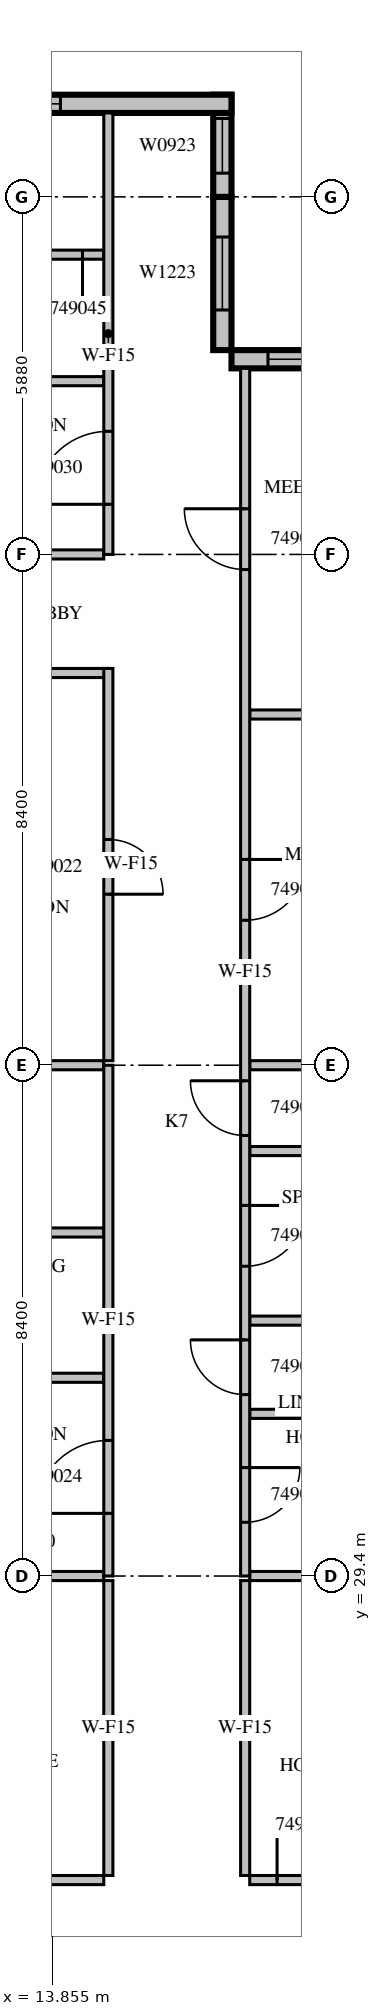
"""IFC4 building model, lengths in metres.
Left out: names, types, materials, properties, quantities, classifications, styles, units other than length and angle.
Written with IfcOpenShell. Run it as: python <this file> out.ifc"""

import sys

from ifc_helpers import new_model, si_unit, direction, frame, frame_2d, origin, place, context, subcontext, project, spatial, rectangle, extrude, source, transform, mapped, element, fill, save


model = new_model("IFC4")
c1 = context("Model", 3, precision=1e-05, world=origin(), true_north=direction((0.0, 1.0)))
c2 = subcontext(c1, "Body", "Model", "MODEL_VIEW")
j1 = project(units=[si_unit("LENGTHUNIT", "METRE"), si_unit("PLANEANGLEUNIT", "RADIAN")], contexts=[c1])
p1 = place(None, origin())
s1 = spatial("IfcSite", under=j1, at=p1, CompositionType="ELEMENT")
p2 = place(p1, origin())
s2 = spatial("IfcBuilding", under=s1, at=p2, CompositionType="ELEMENT")
p3 = place(p2, frame((0.0, 0.0, 219.6)))
s3 = spatial("IfcBuildingStorey", under=s2, at=p3, CompositionType="ELEMENT", Elevation=219.6)
m1 = source(origin(), c2, "Body", "SweptSolid", [
    extrude(rectangle(XDim=4.2, YDim=0.3, at=frame_2d((2.1, 0.0))), origin(), (0.0, 0.0, 1.0), 3.4),
])
p4 = place(p3, frame((21.0, 49.41, 0.0), z_axis=(0.0, 0.0, 1.0), x_axis=(-1.0, 0.0, 0.0)))
e1 = element("IfcWall", 1, at=p4, inside=s3, PredefinedType="STANDARD", context=c2, shape_type="MappedRepresentation", body=[
    mapped(m1, transform((0.0, 0.0, 0.0), scale=1.0)),
])
m2 = source(origin(), c2, "Body", "SweptSolid", [
    extrude(rectangle(XDim=3.0, YDim=2.3, at=frame_2d((1.5, 1.15))), frame((0.0, 0.16, 0.0), z_axis=(0.0, -1.0, 0.0), x_axis=(1.0, 0.0, 0.0)), (0.0, 0.0, 1.0), 0.32),
])
p5 = place(p4, frame((0.6, 0.0, 0.6)))
e2 = element("IfcOpeningElement", 2, at=p5, cuts=e1, PredefinedType="OPENING", context=c2, shape_type="MappedRepresentation", body=[
    mapped(m2, transform((0.0, 0.0, 0.0), scale=1.0)),
])
m3 = source(origin(), c2, "Body", "SweptSolid", [
    extrude(rectangle(XDim=2.52, YDim=0.3, at=frame_2d((1.26, 0.0))), origin(), (0.0, 0.0, 1.0), 3.4),
])
p6 = place(p3, frame((16.65, 49.56, 0.0), z_axis=(0.0, 0.0, 1.0), x_axis=(0.0, 1.0, 0.0)))
e3 = element("IfcWall", 3, at=p6, inside=s3, PredefinedType="STANDARD", context=c2, shape_type="MappedRepresentation", body=[
    mapped(m3, transform((0.0, 0.0, 0.0), scale=1.0)),
])
m4 = source(origin(), c2, "Body", "SweptSolid", [
    extrude(rectangle(XDim=1.2, YDim=2.3, at=frame_2d((0.6, 1.15))), frame((0.0, 0.16, 0.0), z_axis=(0.0, -1.0, 0.0), x_axis=(1.0, 0.0, 0.0)), (0.0, 0.0, 1.0), 0.32),
])
p7 = place(p6, frame((0.66, 0.0, 0.6)))
e4 = element("IfcOpeningElement", 4, at=p7, cuts=e3, PredefinedType="OPENING", context=c2, shape_type="MappedRepresentation", body=[
    mapped(m4, transform((0.0, 0.0, 0.0), scale=1.0)),
])
m5 = source(origin(), c2, "Body", "SweptSolid", [
    extrude(rectangle(XDim=1.68, YDim=0.3, at=frame_2d((0.84, 0.0))), origin(), (0.0, 0.0, 1.0), 3.4),
])
p8 = place(p3, frame((16.65, 52.08, 0.0), z_axis=(0.0, 0.0, 1.0), x_axis=(0.0, 1.0, 0.0)))
e5 = element("IfcWall", 5, at=p8, inside=s3, PredefinedType="STANDARD", context=c2, shape_type="MappedRepresentation", body=[
    mapped(m5, transform((0.0, 0.0, 0.0), scale=1.0)),
])
m6 = source(origin(), c2, "Body", "SweptSolid", [
    extrude(rectangle(XDim=0.9, YDim=2.3, at=frame_2d((0.45, 1.15))), frame((0.0, 0.16, 0.0), z_axis=(0.0, -1.0, 0.0), x_axis=(1.0, 0.0, 0.0)), (0.0, 0.0, 1.0), 0.32),
])
p9 = place(p8, frame((0.39, 0.0, 0.6)))
e6 = element("IfcOpeningElement", 6, at=p9, cuts=e5, PredefinedType="OPENING", context=c2, shape_type="MappedRepresentation", body=[
    mapped(m6, transform((0.0, 0.0, 0.0), scale=1.0)),
])
m7 = source(origin(), c2, "Body", "SweptSolid", [
    extrude(rectangle(XDim=10.5, YDim=0.3, at=frame_2d((5.25, 0.0))), origin(), (0.0, 0.0, 1.0), 3.4),
])
p10 = place(p3, frame((16.8, 53.61, 0.0), z_axis=(0.0, 0.0, 1.0), x_axis=(-1.0, 0.0, 0.0)))
e7 = element("IfcWall", 7, at=p10, inside=s3, PredefinedType="STANDARD", context=c2, shape_type="MappedRepresentation", body=[
    mapped(m7, transform((0.0, 0.0, 0.0), scale=1.0)),
])
m8 = source(origin(), c2, "Body", "SweptSolid", [
    extrude(rectangle(XDim=1.8, YDim=2.3, at=frame_2d((0.9, 1.15))), frame((0.0, 0.16, 0.0), z_axis=(0.0, -1.0, 0.0), x_axis=(1.0, 0.0, 0.0)), (0.0, 0.0, 1.0), 0.32),
])
p11 = place(p10, frame((8.025, 0.0, 0.6)))
e8 = element("IfcOpeningElement", 8, at=p11, cuts=e7, PredefinedType="OPENING", context=c2, shape_type="MappedRepresentation", body=[
    mapped(m8, transform((0.0, 0.0, 0.0), scale=1.0)),
])
m9 = source(origin(), c2, "Body", "SweptSolid", [
    extrude(rectangle(XDim=2.4, YDim=2.3, at=frame_2d((1.2, 1.15))), frame((0.0, 0.16, 0.0), z_axis=(0.0, -1.0, 0.0), x_axis=(1.0, 0.0, 0.0)), (0.0, 0.0, 1.0), 0.32),
])
p12 = place(p10, frame((2.812, 0.0, 0.6)))
e9 = element("IfcOpeningElement", 9, at=p12, cuts=e7, PredefinedType="OPENING", context=c2, shape_type="MappedRepresentation", body=[
    mapped(m9, transform((0.0, 0.0, 0.0), scale=1.0)),
])
m10 = source(origin(), c2, "Body", "SweptSolid", [
    extrude(rectangle(XDim=8.195, YDim=0.15, at=frame_2d((4.098, 0.0))), origin(), (0.0, 0.0, 1.0), 3.4),
])
p13 = place(p3, frame((6.505, 24.4, 0.0), z_axis=(0.0, 0.0, 1.0), x_axis=(1.0, 0.0, 0.0)))
e10 = element("IfcWall", 10, at=p13, inside=s3, PredefinedType="PARTITIONING", context=c2, shape_type="MappedRepresentation", body=[
    mapped(m10, transform((0.0, 0.0, 0.0), scale=1.0)),
])
m11 = source(origin(), c2, "Body", "SweptSolid", [
    extrude(rectangle(XDim=0.9, YDim=2.1, at=frame_2d((0.45, 1.05))), frame((0.0, 0.085, 0.0), z_axis=(0.0, -1.0, 0.0), x_axis=(1.0, 0.0, 0.0)), (0.0, 0.0, 1.0), 0.17),
])
p14 = place(p13, frame((1.395, 0.0, 0.0)))
e11 = element("IfcOpeningElement", 11, at=p14, cuts=e10, PredefinedType="OPENING", context=c2, shape_type="MappedRepresentation", body=[
    mapped(m11, transform((0.0, 0.0, 0.0), scale=1.0)),
])
p15 = place(p13, frame((6.32, 0.0, 0.0)))
e12 = element("IfcOpeningElement", 12, at=p15, cuts=e10, PredefinedType="OPENING", context=c2, shape_type="MappedRepresentation", body=[
    mapped(m11, transform((0.0, 0.0, 0.0), scale=1.0)),
])
m12 = source(origin(), c2, "Body", "SweptSolid", [
    extrude(rectangle(XDim=3.6, YDim=0.15, at=frame_2d((1.8, 0.0))), origin(), (0.0, 0.0, 1.0), 3.4),
])
p16 = place(p3, frame((17.1, 24.4, 0.0), z_axis=(0.0, 0.0, 1.0), x_axis=(1.0, 0.0, 0.0)))
e13 = element("IfcWall", 13, at=p16, inside=s3, PredefinedType="PARTITIONING", context=c2, shape_type="MappedRepresentation", body=[
    mapped(m12, transform((0.0, 0.0, 0.0), scale=1.0)),
])
p17 = place(p16, frame((0.45, 0.0, 0.0)))
e14 = element("IfcOpeningElement", 14, at=p17, cuts=e13, PredefinedType="OPENING", context=c2, shape_type="MappedRepresentation", body=[
    mapped(m11, transform((0.0, 0.0, 0.0), scale=1.0)),
])
m13 = source(origin(), c2, "Body", "SweptSolid", [
    extrude(rectangle(XDim=4.85, YDim=0.15, at=frame_2d((2.425, 0.0))), origin(), (0.0, 0.0, 1.0), 3.4),
])
for number, where, z_axis, x_axis in (
    (15, (14.775, 24.475, 0.0), (0.0, 0.0, 1.0), (0.0, 1.0, 0.0)),
    (16, (17.025, 29.325, 0.0), (0.0, 0.0, 1.0), (0.0, -1.0, 0.0)),
):
    element("IfcWall", number, at=place(p3, frame(where, z_axis=z_axis, x_axis=x_axis)), inside=s3, PredefinedType="PARTITIONING", context=c2, shape_type="MappedRepresentation", body=[
        mapped(m13, transform((0.0, 0.0, 0.0), scale=1.0)),
    ])
m14 = source(origin(), c2, "Body", "SweptSolid", [
    extrude(rectangle(XDim=3.751, YDim=0.15, at=frame_2d((1.875, 0.0))), origin(), (0.0, 0.0, 1.0), 3.4),
])
p18 = place(p3, frame((14.7, 29.4, 0.0), z_axis=(0.0, 0.0, 1.0), x_axis=(-1.0, 0.0, 0.0)))
e17 = element("IfcWall", 17, at=p18, inside=s3, PredefinedType="PARTITIONING", context=c2, shape_type="MappedRepresentation", body=[
    mapped(m14, transform((0.0, 0.0, 0.0), scale=1.0)),
])
m15 = source(origin(), c2, "Body", "SweptSolid", [
    extrude(rectangle(XDim=3.001, YDim=0.15, at=frame_2d((1.5, 0.0))), origin(), (0.0, 0.0, 1.0), 3.4),
])
p19 = place(p3, frame((20.101, 29.4, 0.0), z_axis=(0.0, 0.0, 1.0), x_axis=(-1.0, 0.0, 0.0)))
e18 = element("IfcWall", 18, at=p19, inside=s3, PredefinedType="PARTITIONING", context=c2, shape_type="MappedRepresentation", body=[
    mapped(m15, transform((0.0, 0.0, 0.0), scale=1.0)),
])
m16 = source(origin(), c2, "Body", "SweptSolid", [
    extrude(rectangle(XDim=2.875, YDim=0.15, at=frame_2d((1.438, 0.0))), origin(), (0.0, 0.0, 1.0), 3.4),
])
p20 = place(p3, frame((14.775, 44.25, 0.0), z_axis=(0.0, 0.0, 1.0), x_axis=(-1.0, 0.0, 0.0)))
e19 = element("IfcWall", 19, at=p20, inside=s3, PredefinedType="PARTITIONING", context=c2, shape_type="MappedRepresentation", body=[
    mapped(m16, transform((0.0, 0.0, 0.0), scale=1.0)),
])
m17 = source(origin(), c2, "Body", "SweptSolid", [
    extrude(rectangle(XDim=6.45, YDim=0.15, at=frame_2d((3.225, 0.0))), origin(), (0.0, 0.0, 1.0), 3.4),
])
p21 = place(p3, frame((14.775, 37.875, 0.0), z_axis=(0.0, 0.0, 1.0), x_axis=(0.0, 1.0, 0.0)))
e20 = element("IfcWall", 20, at=p21, inside=s3, PredefinedType="PARTITIONING", context=c2, shape_type="MappedRepresentation", body=[
    mapped(m17, transform((0.0, 0.0, 0.0), scale=1.0)),
])
p22 = place(p21, frame((2.737, 0.0, 0.0)))
e21 = element("IfcOpeningElement", 21, at=p22, cuts=e20, PredefinedType="OPENING", context=c2, shape_type="MappedRepresentation", body=[
    mapped(m11, transform((0.0, 0.0, 0.0), scale=1.0)),
])
for number, where, z_axis, x_axis in (
    (22, (14.7, 32.66, 0.0), (0.0, 0.0, 1.0), (-1.0, 0.0, 0.0)),
    (23, (14.7, 35.049, 0.0), (0.0, 0.0, 1.0), (-1.0, 0.0, 0.0)),
    (24, (14.7, 37.8, 0.0), (0.0, 0.0, 1.0), (-1.0, 0.0, 0.0)),
    (25, (14.7, 49.049, 0.0), (0.0, 0.0, 1.0), (-1.0, 0.0, 0.0)),
):
    element("IfcWall", number, at=place(p3, frame(where, z_axis=z_axis, x_axis=x_axis)), inside=s3, PredefinedType="PARTITIONING", context=c2, shape_type="MappedRepresentation", body=[
        mapped(m12, transform((0.0, 0.0, 0.0), scale=1.0)),
    ])
p23 = place(p3, frame((14.7, 51.13, 0.0), z_axis=(0.0, 0.0, 1.0), x_axis=(-1.0, 0.0, 0.0)))
e26 = element("IfcWall", 26, at=p23, inside=s3, PredefinedType="PARTITIONING", context=c2, shape_type="MappedRepresentation", body=[
    mapped(m12, transform((0.0, 0.0, 0.0), scale=1.0)),
])
p24 = place(p23, frame((1.35, 0.0, 0.0)))
e27 = element("IfcOpeningElement", 27, at=p24, cuts=e26, PredefinedType="OPENING", context=c2, shape_type="MappedRepresentation", body=[
    mapped(m11, transform((0.0, 0.0, 0.0), scale=1.0)),
])
p25 = place(p23, frame((0.35, 0.0, 0.0)))
e28 = element("IfcOpeningElement", 28, at=p25, cuts=e26, PredefinedType="OPENING", context=c2, shape_type="MappedRepresentation", body=[
    mapped(m11, transform((0.0, 0.0, 0.0), scale=1.0)),
])
p26 = place(p23, frame((2.35, 0.0, 0.0)))
e29 = element("IfcOpeningElement", 29, at=p26, cuts=e26, PredefinedType="OPENING", context=c2, shape_type="MappedRepresentation", body=[
    mapped(m11, transform((0.0, 0.0, 0.0), scale=1.0)),
])
for number, where, z_axis, x_axis in (
    (30, (14.7, 46.2, 0.0), (0.0, 0.0, 1.0), (-1.0, 0.0, 0.0)),
    (31, (17.1, 32.067, 0.0), (0.0, 0.0, 1.0), (1.0, 0.0, 0.0)),
    (32, (17.1, 36.389, 0.0), (0.0, 0.0, 1.0), (1.0, 0.0, 0.0)),
    (33, (17.1, 43.568, 0.0), (0.0, 0.0, 1.0), (1.0, 0.0, 0.0)),
    (34, (20.7, 33.6, 0.0), (0.0, 0.0, 1.0), (-1.0, 0.0, 0.0)),
):
    element("IfcWall", number, at=place(p3, frame(where, z_axis=z_axis, x_axis=x_axis)), inside=s3, PredefinedType="PARTITIONING", context=c2, shape_type="MappedRepresentation", body=[
        mapped(m12, transform((0.0, 0.0, 0.0), scale=1.0)),
    ])
p27 = place(p3, frame((20.101, 37.8, 0.0), z_axis=(0.0, 0.0, 1.0), x_axis=(-1.0, 0.0, 0.0)))
e35 = element("IfcWall", 35, at=p27, inside=s3, PredefinedType="PARTITIONING", context=c2, shape_type="MappedRepresentation", body=[
    mapped(m15, transform((0.0, 0.0, 0.0), scale=1.0)),
])
m18 = source(origin(), c2, "Body", "SweptSolid", [
    extrude(rectangle(XDim=8.4, YDim=0.15, at=frame_2d((4.2, 0.0))), origin(), (0.0, 0.0, 1.0), 3.4),
])
p28 = place(p3, frame((14.775, 29.4, 0.0), z_axis=(0.0, 0.0, 1.0), x_axis=(0.0, 1.0, 0.0)))
e36 = element("IfcWall", 36, at=p28, inside=s3, PredefinedType="PARTITIONING", context=c2, shape_type="MappedRepresentation", body=[
    mapped(m18, transform((0.0, 0.0, 0.0), scale=1.0)),
])
m19 = source(origin(), c2, "Body", "SweptSolid", [
    extrude(rectangle(XDim=1.2, YDim=2.1, at=frame_2d((0.6, 1.05))), frame((0.0, 0.085, 0.0), z_axis=(0.0, -1.0, 0.0), x_axis=(1.0, 0.0, 0.0)), (0.0, 0.0, 1.0), 0.17),
])
p29 = place(p28, frame((1.03, 0.0, 0.0)))
e37 = element("IfcOpeningElement", 37, at=p29, cuts=e36, PredefinedType="OPENING", context=c2, shape_type="MappedRepresentation", body=[
    mapped(m19, transform((0.0, 0.0, 0.0), scale=1.0)),
])
m20 = source(origin(), c2, "Body", "SweptSolid", [
    extrude(rectangle(XDim=7.26, YDim=0.15, at=frame_2d((3.63, 0.0))), origin(), (0.0, 0.0, 1.0), 3.4),
])
p30 = place(p3, frame((14.775, 46.2, 0.0), z_axis=(0.0, 0.0, 1.0), x_axis=(0.0, 1.0, 0.0)))
e38 = element("IfcWall", 38, at=p30, inside=s3, PredefinedType="PARTITIONING", context=c2, shape_type="MappedRepresentation", body=[
    mapped(m20, transform((0.0, 0.0, 0.0), scale=1.0)),
])
p31 = place(p30, frame((0.825, 0.0, 0.0)))
e39 = element("IfcOpeningElement", 39, at=p31, cuts=e38, PredefinedType="OPENING", context=c2, shape_type="MappedRepresentation", body=[
    mapped(m19, transform((0.0, 0.0, 0.0), scale=1.0)),
])
m21 = source(origin(), c2, "Body", "SweptSolid", [
    extrude(rectangle(XDim=19.86, YDim=0.15, at=frame_2d((9.93, 0.0))), origin(), (0.0, 0.0, 1.0), 3.4),
])
p32 = place(p3, frame((17.025, 49.26, 0.0), z_axis=(0.0, 0.0, 1.0), x_axis=(0.0, -1.0, 0.0)))
e40 = element("IfcWall", 40, at=p32, inside=s3, PredefinedType="PARTITIONING", context=c2, shape_type="MappedRepresentation", body=[
    mapped(m21, transform((0.0, 0.0, 0.0), scale=1.0)),
])
p33 = place(p32, frame((18.076, 0.0, 0.0)))
e41 = element("IfcOpeningElement", 41, at=p33, cuts=e40, PredefinedType="OPENING", context=c2, shape_type="MappedRepresentation", body=[
    mapped(m11, transform((0.0, 0.0, 0.0), scale=1.0)),
])
p34 = place(p32, frame((15.976, 0.0, 0.0)))
e42 = element("IfcOpeningElement", 42, at=p34, cuts=e40, PredefinedType="OPENING", context=c2, shape_type="MappedRepresentation", body=[
    mapped(m11, transform((0.0, 0.0, 0.0), scale=1.0)),
])
m22 = source(origin(), c2, "Body", "SweptSolid", [
    extrude(rectangle(XDim=1.0, YDim=2.1, at=frame_2d((0.5, 1.05))), frame((0.0, 0.085, 0.0), z_axis=(0.0, -1.0, 0.0), x_axis=(1.0, 0.0, 0.0)), (0.0, 0.0, 1.0), 0.17),
])
p35 = place(p32, frame((13.766, 0.0, 0.0)))
e43 = element("IfcOpeningElement", 43, at=p35, cuts=e40, PredefinedType="OPENING", context=c2, shape_type="MappedRepresentation", body=[
    mapped(m22, transform((0.0, 0.0, 0.0), scale=1.0)),
])
p36 = place(p32, frame((11.716, 0.0, 0.0)))
e44 = element("IfcOpeningElement", 44, at=p36, cuts=e40, PredefinedType="OPENING", context=c2, shape_type="MappedRepresentation", body=[
    mapped(m11, transform((0.0, 0.0, 0.0), scale=1.0)),
])
p37 = place(p32, frame((8.076, 0.0, 0.0)))
e45 = element("IfcOpeningElement", 45, at=p37, cuts=e40, PredefinedType="OPENING", context=c2, shape_type="MappedRepresentation", body=[
    mapped(m22, transform((0.0, 0.0, 0.0), scale=1.0)),
])
p38 = place(p32, frame((2.309, 0.0, 0.0)))
e46 = element("IfcOpeningElement", 46, at=p38, cuts=e40, PredefinedType="OPENING", context=c2, shape_type="MappedRepresentation", body=[
    mapped(m22, transform((0.0, 0.0, 0.0), scale=1.0)),
])
m23 = source(origin(), c2, "Body", "SweptSolid", [
    extrude(rectangle(XDim=3.0, YDim=2.3, at=frame_2d((1.5, 1.15))), frame((0.0, 0.03, 0.0), z_axis=(0.0, -1.0, 0.0), x_axis=(1.0, 0.0, 0.0)), (0.0, 0.0, 1.0), 0.06),
])
p39 = place(p5, origin())
e47 = element("IfcWindow", 47, at=p39, inside=s3, PartitioningType="SINGLE_PANEL", PredefinedType="WINDOW", context=c2, shape_type="MappedRepresentation", body=[
    mapped(m23, transform((0.0, 0.0, 0.0), scale=1.0)),
])
fill(e2, e47)
m24 = source(origin(), c2, "Body", "SweptSolid", [
    extrude(rectangle(XDim=1.2, YDim=2.3, at=frame_2d((0.6, 1.15))), frame((0.0, 0.03, 0.0), z_axis=(0.0, -1.0, 0.0), x_axis=(1.0, 0.0, 0.0)), (0.0, 0.0, 1.0), 0.06),
])
p40 = place(p7, origin())
e48 = element("IfcWindow", 48, at=p40, inside=s3, PartitioningType="SINGLE_PANEL", PredefinedType="WINDOW", context=c2, shape_type="MappedRepresentation", body=[
    mapped(m24, transform((0.0, 0.0, 0.0), scale=1.0)),
])
fill(e4, e48)
m25 = source(origin(), c2, "Body", "SweptSolid", [
    extrude(rectangle(XDim=0.9, YDim=2.3, at=frame_2d((0.45, 1.15))), frame((0.0, 0.03, 0.0), z_axis=(0.0, -1.0, 0.0), x_axis=(1.0, 0.0, 0.0)), (0.0, 0.0, 1.0), 0.06),
])
p41 = place(p9, origin())
e49 = element("IfcWindow", 49, at=p41, inside=s3, PartitioningType="SINGLE_PANEL", PredefinedType="WINDOW", context=c2, shape_type="MappedRepresentation", body=[
    mapped(m25, transform((0.0, 0.0, 0.0), scale=1.0)),
])
fill(e6, e49)
m26 = source(origin(), c2, "Body", "SweptSolid", [
    extrude(rectangle(XDim=2.4, YDim=2.3, at=frame_2d((1.2, 1.15))), frame((0.0, 0.03, 0.0), z_axis=(0.0, -1.0, 0.0), x_axis=(1.0, 0.0, 0.0)), (0.0, 0.0, 1.0), 0.06),
])
p42 = place(p12, origin())
e50 = element("IfcWindow", 50, at=p42, inside=s3, PartitioningType="SINGLE_PANEL", PredefinedType="WINDOW", context=c2, shape_type="MappedRepresentation", body=[
    mapped(m26, transform((0.0, 0.0, 0.0), scale=1.0)),
])
fill(e9, e50)
m27 = source(origin(), c2, "Body", "SweptSolid", [
    extrude(rectangle(XDim=0.9, YDim=2.1, at=frame_2d((0.45, 1.05))), frame((0.0, 0.025, 0.0), z_axis=(0.0, -1.0, 0.0), x_axis=(1.0, 0.0, 0.0)), (0.0, 0.0, 1.0), 0.05),
])
p43 = place(p17, origin())
e51 = element("IfcDoor", 51, at=p43, inside=s3, OperationType="SINGLE_SWING_LEFT", PredefinedType="DOOR", context=c2, shape_type="MappedRepresentation", body=[
    mapped(m27, transform((0.0, 0.0, 0.0), scale=1.0)),
])
fill(e14, e51)
p44 = place(p22, origin())
e52 = element("IfcDoor", 52, at=p44, inside=s3, OperationType="SINGLE_SWING_RIGHT", PredefinedType="DOOR", context=c2, shape_type="MappedRepresentation", body=[
    mapped(m27, transform((0.0, 0.0, 0.0), scale=1.0)),
])
fill(e21, e52)
m28 = source(origin(), c2, "Body", "SweptSolid", [
    extrude(rectangle(XDim=1.2, YDim=2.1, at=frame_2d((0.6, 1.05))), frame((0.0, 0.025, 0.0), z_axis=(0.0, -1.0, 0.0), x_axis=(1.0, 0.0, 0.0)), (0.0, 0.0, 1.0), 0.05),
])
p45 = place(p29, origin())
e53 = element("IfcDoor", 53, at=p45, inside=s3, OperationType="SINGLE_SWING_LEFT", PredefinedType="DOOR", context=c2, shape_type="MappedRepresentation", body=[
    mapped(m28, transform((0.0, 0.0, 0.0), scale=1.0)),
])
fill(e37, e53)
p46 = place(p31, origin())
e54 = element("IfcDoor", 54, at=p46, inside=s3, OperationType="SINGLE_SWING_LEFT", PredefinedType="DOOR", context=c2, shape_type="MappedRepresentation", body=[
    mapped(m28, transform((0.0, 0.0, 0.0), scale=1.0)),
])
fill(e39, e54)
p47 = place(p33, origin())
e55 = element("IfcDoor", 55, at=p47, inside=s3, OperationType="SINGLE_SWING_LEFT", PredefinedType="DOOR", context=c2, shape_type="MappedRepresentation", body=[
    mapped(m27, transform((0.0, 0.0, 0.0), scale=1.0)),
])
fill(e41, e55)
p48 = place(p34, origin())
e56 = element("IfcDoor", 56, at=p48, inside=s3, OperationType="SINGLE_SWING_RIGHT", PredefinedType="DOOR", context=c2, shape_type="MappedRepresentation", body=[
    mapped(m27, transform((0.0, 0.0, 0.0), scale=1.0)),
])
fill(e42, e56)
m29 = source(origin(), c2, "Body", "SweptSolid", [
    extrude(rectangle(XDim=1.0, YDim=2.1, at=frame_2d((0.5, 1.05))), frame((0.0, 0.025, 0.0), z_axis=(0.0, -1.0, 0.0), x_axis=(1.0, 0.0, 0.0)), (0.0, 0.0, 1.0), 0.05),
])
p49 = place(p35, origin())
e57 = element("IfcDoor", 57, at=p49, inside=s3, OperationType="SINGLE_SWING_LEFT", PredefinedType="DOOR", context=c2, shape_type="MappedRepresentation", body=[
    mapped(m29, transform((0.0, 0.0, 0.0), scale=1.0)),
])
fill(e43, e57)
p50 = place(p36, origin())
e58 = element("IfcDoor", 58, at=p50, inside=s3, OperationType="SINGLE_SWING_RIGHT", PredefinedType="DOOR", context=c2, shape_type="MappedRepresentation", body=[
    mapped(m27, transform((0.0, 0.0, 0.0), scale=1.0)),
])
fill(e44, e58)
p51 = place(p37, origin())
e59 = element("IfcDoor", 59, at=p51, inside=s3, OperationType="SINGLE_SWING_LEFT", PredefinedType="DOOR", context=c2, shape_type="MappedRepresentation", body=[
    mapped(m29, transform((0.0, 0.0, 0.0), scale=1.0)),
])
fill(e45, e59)
p52 = place(p38, origin())
e60 = element("IfcDoor", 60, at=p52, inside=s3, OperationType="SINGLE_SWING_RIGHT", PredefinedType="DOOR", context=c2, shape_type="MappedRepresentation", body=[
    mapped(m29, transform((0.0, 0.0, 0.0), scale=1.0)),
])
fill(e46, e60)
p53 = place(p25, origin())
e61 = element("IfcDoor", 61, at=p53, inside=s3, OperationType="SINGLE_SWING_LEFT", PredefinedType="DOOR", context=c2, shape_type="MappedRepresentation", body=[
    mapped(m27, transform((0.0, 0.0, 0.0), scale=1.0)),
])
fill(e28, e61)
save(model, sys.argv[1])
